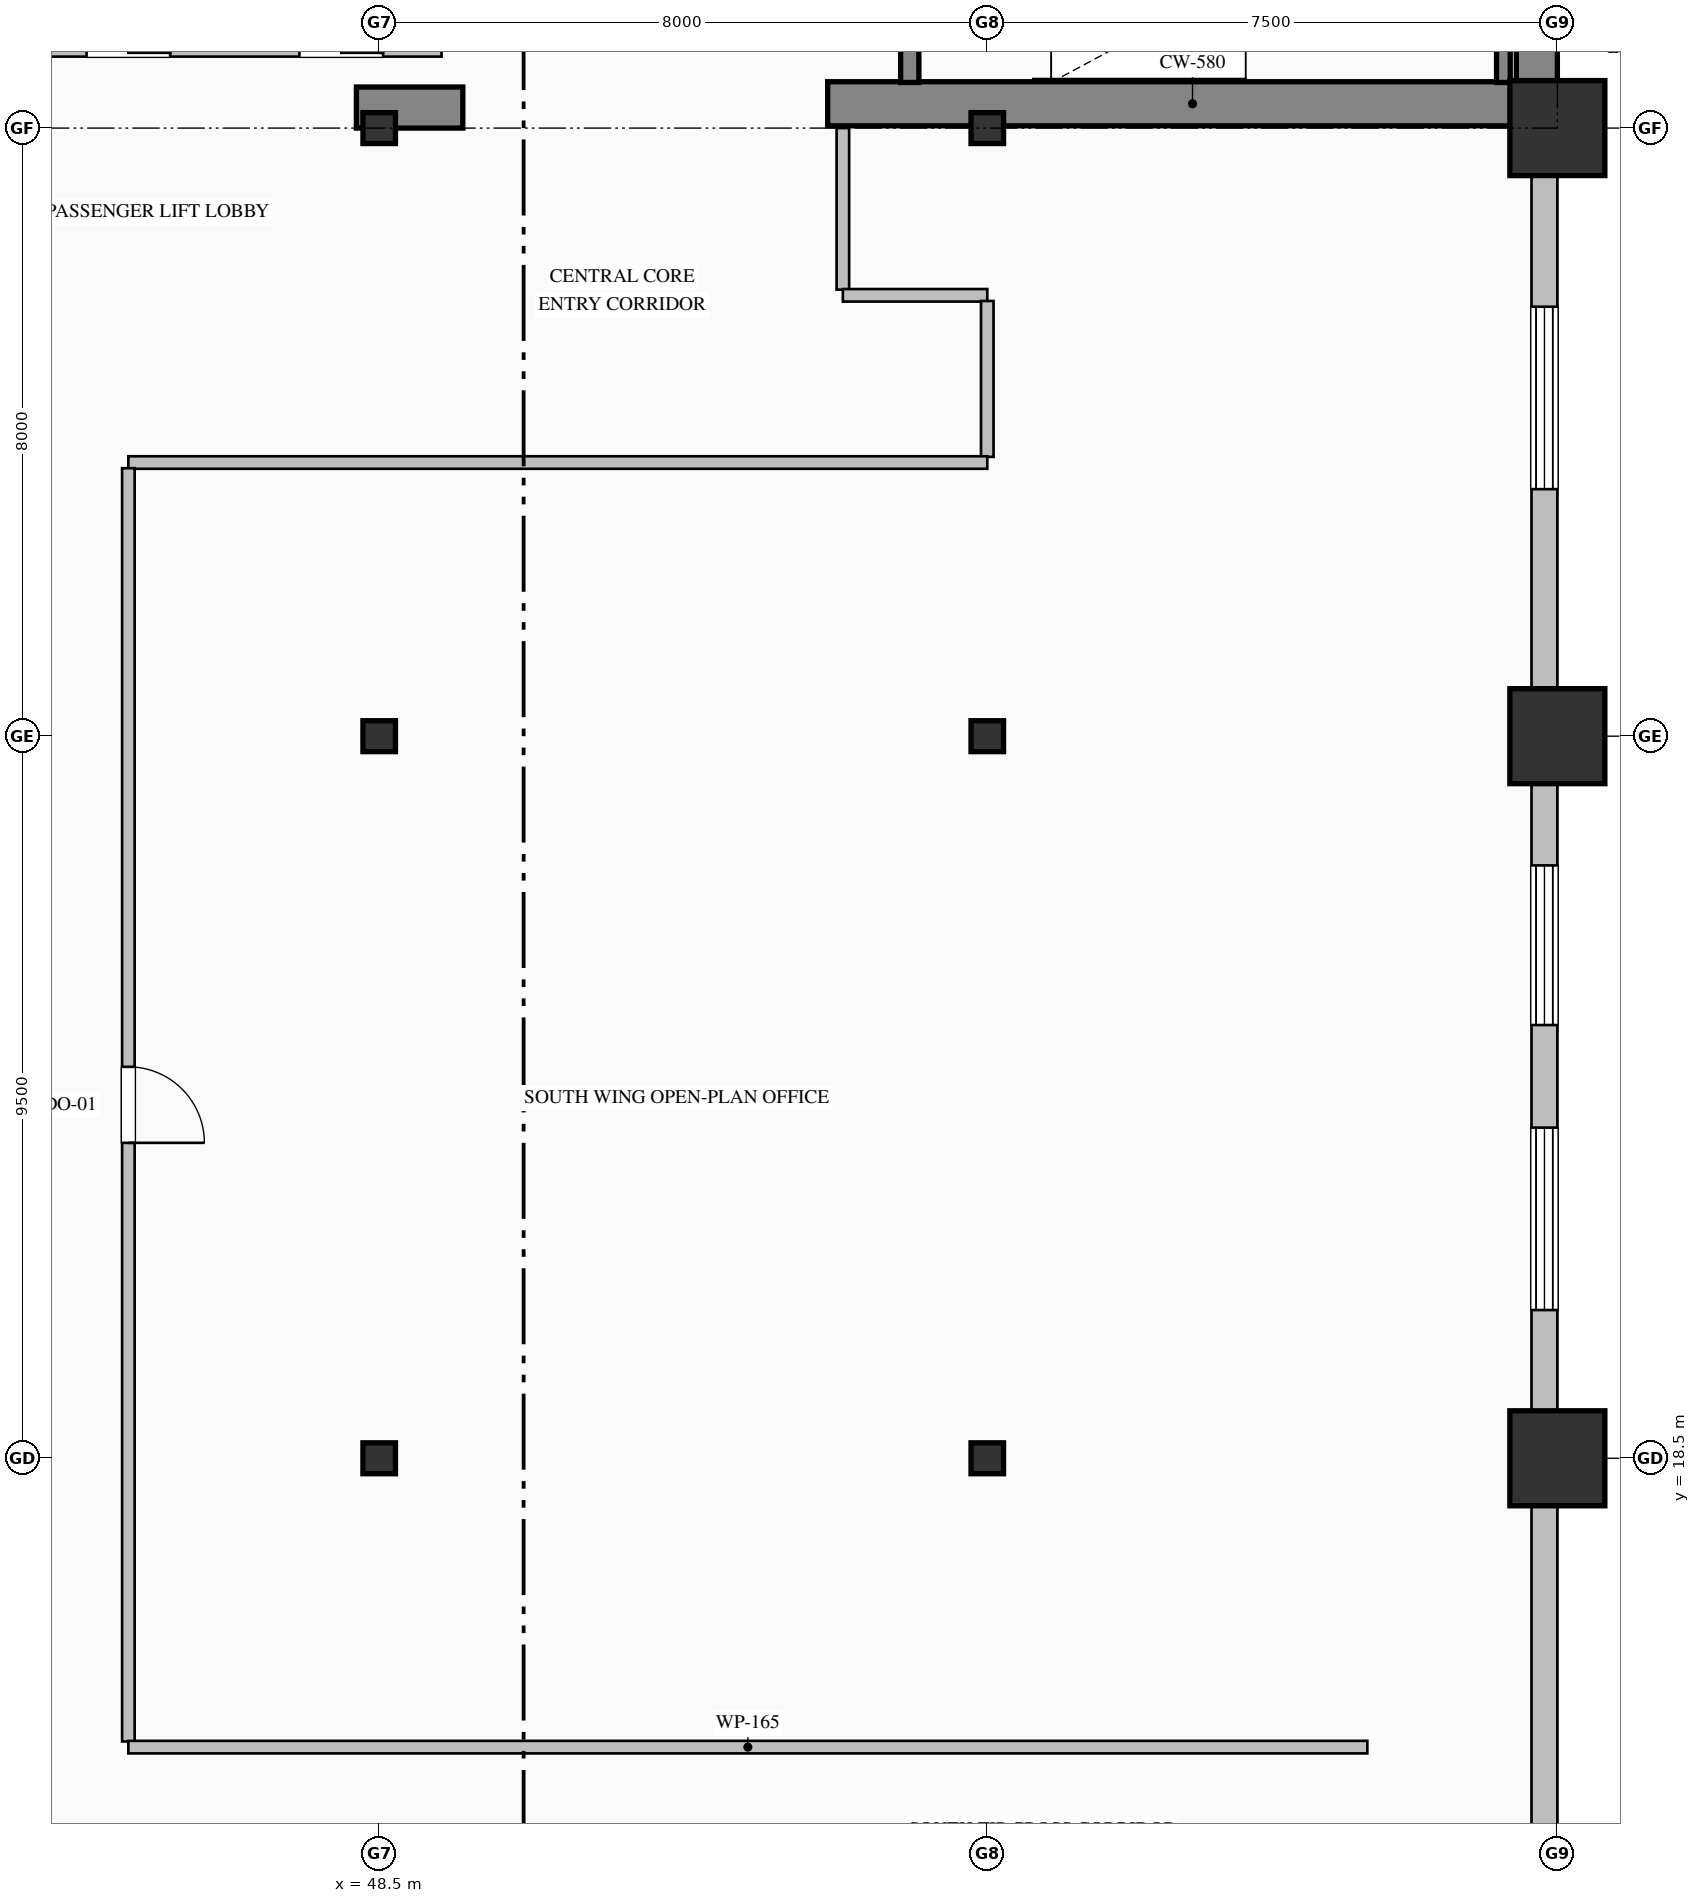
"""IFC4 building model, lengths in metres.
Left out: names, types, materials, properties, quantities, classifications, styles, units other than length and angle.
Written with IfcOpenShell. Run it as: python <this file> out.ifc"""

import sys

from ifc_helpers import new_model, si_unit, direction, frame, frame_2d, origin, origin_2d, place, context, subcontext, project, spatial, rectangle, hollow_rectangle, i_section, extrude, element, fill, save


model = new_model("IFC4")
c1 = context("Model", 3, precision=1e-05, world=origin(), true_north=direction((0.0, 1.0)))
c2 = subcontext(c1, "Body", "Model", "MODEL_VIEW")
j1 = project(units=[si_unit("LENGTHUNIT", "METRE"), si_unit("PLANEANGLEUNIT", "RADIAN")], contexts=[c1])
p1 = place(None, origin())
s1 = spatial("IfcSite", under=j1, at=p1, CompositionType="ELEMENT")
p2 = place(p1, origin())
s2 = spatial("IfcBuilding", under=s1, at=p2, CompositionType="ELEMENT")
p3 = place(p2, frame((0.0, 0.0, 48.2)))
s3 = spatial("IfcBuildingStorey", under=s2, at=p3, CompositionType="ELEMENT", Elevation=48.2)
p4 = place(p3, frame((63.73, 36.32, 0.0), z_axis=(0.0, 0.0, 1.0), x_axis=(0.0, 1.0, 0.0)))
e1 = element("IfcWall", 1, at=p4, inside=s3, PredefinedType="SHEAR", context=c2, shape_type="SweptSolid", body=[
    extrude(rectangle(XDim=15.14, YDim=0.54, at=frame_2d((7.57, 0.0))), origin(), (0.0, 0.0, 1.0), 3.75),
])
p5 = place(p3, frame((48.2, 36.27, 0.0), z_axis=(0.0, 0.0, 1.0), x_axis=(1.0, 0.0, 0.0)))
e2 = element("IfcWall", 2, at=p5, inside=s3, PredefinedType="SHEAR", context=c2, shape_type="SweptSolid", body=[
    extrude(rectangle(XDim=1.4, YDim=0.54, at=frame_2d((0.7, 0.0))), origin(), (0.0, 0.0, 1.0), 3.75),
])
p6 = place(p3, frame((54.4, 36.32, 0.0), z_axis=(0.0, 0.0, 1.0), x_axis=(1.0, 0.0, 0.0)))
e3 = element("IfcWall", 3, at=p6, inside=s3, PredefinedType="SHEAR", context=c2, shape_type="SweptSolid", body=[
    extrude(rectangle(XDim=9.6, YDim=0.58, at=frame_2d((4.8, 0.0))), origin(), (0.0, 0.0, 1.0), 4.0),
])
for number, where, z_axis, x_axis in (
    (4, (48.5, 18.5, 0.0), (0.0, 0.0, 1.0), (1.0, 0.0, 0.0)),
    (5, (48.5, 28.0, 0.0), (0.0, 0.0, 1.0), (1.0, 0.0, 0.0)),
    (6, (48.5, 36.0, 0.0), (0.0, 0.0, 1.0), (1.0, 0.0, 0.0)),
    (7, (56.5, 18.5, 0.0), (0.0, 0.0, 1.0), (1.0, 0.0, 0.0)),
    (8, (56.5, 28.0, 0.0), (0.0, 0.0, 1.0), (1.0, 0.0, 0.0)),
    (9, (56.5, 36.0, 0.0), (0.0, 0.0, 1.0), (1.0, 0.0, 0.0)),
):
    element("IfcColumn", number, at=place(p3, frame(where, z_axis=z_axis, x_axis=x_axis)), inside=s3, PredefinedType="COLUMN", context=c2, shape_type="SweptSolid", body=[
        extrude(i_section(OverallWidth=0.407, OverallDepth=0.428, WebThickness=0.02, FlangeThickness=0.035, FilletRadius=0.022, at=origin_2d()), origin(), (0.0, 0.0, 1.0), 4.0),
    ])
for number, where, z_axis, x_axis in (
    (10, (64.0, 18.5, 0.0), (0.0, 0.0, 1.0), (1.0, 0.0, 0.0)),
    (11, (64.0, 28.0, 0.0), (0.0, 0.0, 1.0), (1.0, 0.0, 0.0)),
    (12, (64.0, 36.0, 0.0), (0.0, 0.0, 1.0), (1.0, 0.0, 0.0)),
):
    element("IfcColumn", number, at=place(p3, frame(where, z_axis=z_axis, x_axis=x_axis)), inside=s3, PredefinedType="COLUMN", context=c2, shape_type="SweptSolid", body=[
        extrude(hollow_rectangle(XDim=1.25, YDim=1.25, WallThickness=0.045, at=origin_2d()), origin(), (0.0, 0.0, 1.0), 4.0),
    ])
p7 = place(p3, frame((63.83, 36.05, 0.0), z_axis=(0.0, 0.0, 1.0), x_axis=(0.0, -1.0, 0.0)))
e13 = element("IfcWall", 13, at=p7, inside=s3, PredefinedType="SOLIDWALL", context=c2, shape_type="SweptSolid", body=[
    extrude(rectangle(XDim=28.05, YDim=0.34, at=frame_2d((14.025, 0.0))), origin(), (0.0, 0.0, 1.0), 3.25),
])
p8 = place(p7, frame((2.4, 0.0, 0.8)))
e14 = element("IfcOpeningElement", 14, at=p8, cuts=e13, PredefinedType="OPENING", context=c2, shape_type="SweptSolid", body=[
    extrude(rectangle(XDim=2.4, YDim=2.15, at=frame_2d((1.2, 1.075))), frame((0.0, 0.18, 0.0), z_axis=(0.0, -1.0, 0.0), x_axis=(1.0, 0.0, 0.0)), (0.0, 0.0, 1.0), 0.36),
])
p9 = place(p7, frame((9.75, 0.0, 0.85)))
e15 = element("IfcOpeningElement", 15, at=p9, cuts=e13, PredefinedType="OPENING", context=c2, shape_type="SweptSolid", body=[
    extrude(rectangle(XDim=2.1, YDim=2.05, at=frame_2d((1.05, 1.025))), frame((0.0, 0.18, 0.0), z_axis=(0.0, -1.0, 0.0), x_axis=(1.0, 0.0, 0.0)), (0.0, 0.0, 1.0), 0.36),
])
p10 = place(p7, frame((13.2, 0.0, 0.8)))
e16 = element("IfcOpeningElement", 16, at=p10, cuts=e13, PredefinedType="OPENING", context=c2, shape_type="SweptSolid", body=[
    extrude(rectangle(XDim=2.4, YDim=2.15, at=frame_2d((1.2, 1.075))), frame((0.0, 0.18, 0.0), z_axis=(0.0, -1.0, 0.0), x_axis=(1.0, 0.0, 0.0)), (0.0, 0.0, 1.0), 0.36),
])
p11 = place(p3, frame((55.48, 39.75, 0.0), z_axis=(0.0, 0.0, 1.0), x_axis=(0.0, -1.0, 0.0)))
e17 = element("IfcWall", 17, at=p11, inside=s3, PredefinedType="SOLIDWALL", context=c2, shape_type="SweptSolid", body=[
    extrude(rectangle(XDim=3.15, YDim=0.24, at=frame_2d((1.575, 0.0))), origin(), (0.0, 0.0, 1.0), 4.0),
])
p12 = place(p11, frame((1.0, 0.0, 0.0)))
e18 = element("IfcOpeningElement", 18, at=p12, cuts=e17, PredefinedType="OPENING", context=c2, shape_type="SweptSolid", body=[
    extrude(rectangle(XDim=1.15, YDim=2.2, at=frame_2d((0.575, 1.1))), frame((0.0, 0.13, 0.0), z_axis=(0.0, -1.0, 0.0), x_axis=(1.0, 0.0, 0.0)), (0.0, 0.0, 1.0), 0.26),
])
p13 = place(p3, frame((63.29, 36.6, 0.0), z_axis=(0.0, 0.0, 1.0), x_axis=(0.0, 1.0, 0.0)))
e19 = element("IfcWall", 19, at=p13, inside=s3, PredefinedType="SOLIDWALL", context=c2, shape_type="SweptSolid", body=[
    extrude(rectangle(XDim=3.15, YDim=0.18, at=frame_2d((1.575, 0.0))), origin(), (0.0, 0.0, 1.0), 4.0),
])
p14 = place(p3, frame((49.32, 37.05, 0.0), z_axis=(0.0, 0.0, 1.0), x_axis=(-1.0, 0.0, 0.0)))
e20 = element("IfcWall", 20, at=p14, inside=s3, PredefinedType="PARTITIONING", context=c2, shape_type="SweptSolid", body=[
    extrude(rectangle(XDim=8.24, YDim=0.22, at=frame_2d((4.12, 0.0))), origin(), (0.0, 0.0, 1.0), 3.75),
])
p15 = place(p14, frame((6.37, 0.0, 0.0)))
e21 = element("IfcOpeningElement", 21, at=p15, cuts=e20, PredefinedType="OPENING", context=c2, shape_type="SweptSolid", body=[
    extrude(rectangle(XDim=1.1, YDim=2.2, at=frame_2d((0.55, 1.1))), frame((0.0, 0.12, 0.0), z_axis=(0.0, -1.0, 0.0), x_axis=(1.0, 0.0, 0.0)), (0.0, 0.0, 1.0), 0.24),
])
p16 = place(p14, frame((3.57, 0.0, 0.0)))
e22 = element("IfcOpeningElement", 22, at=p16, cuts=e20, PredefinedType="OPENING", context=c2, shape_type="SweptSolid", body=[
    extrude(rectangle(XDim=1.1, YDim=2.2, at=frame_2d((0.55, 1.1))), frame((0.0, 0.12, 0.0), z_axis=(0.0, -1.0, 0.0), x_axis=(1.0, 0.0, 0.0)), (0.0, 0.0, 1.0), 0.24),
])
p17 = place(p14, frame((0.77, 0.0, 0.0)))
e23 = element("IfcOpeningElement", 23, at=p17, cuts=e20, PredefinedType="OPENING", context=c2, shape_type="SweptSolid", body=[
    extrude(rectangle(XDim=1.1, YDim=2.2, at=frame_2d((0.55, 1.1))), frame((0.0, 0.12, 0.0), z_axis=(0.0, -1.0, 0.0), x_axis=(1.0, 0.0, 0.0)), (0.0, 0.0, 1.0), 0.24),
])
p18 = place(p3, frame((54.6, 36.0, 0.0), z_axis=(0.0, 0.0, 1.0), x_axis=(0.0, -1.0, 0.0)))
e24 = element("IfcWall", 24, at=p18, inside=s3, PredefinedType="PARTITIONING", context=c2, shape_type="SweptSolid", body=[
    extrude(rectangle(XDim=2.125, YDim=0.165, at=frame_2d((1.063, 0.0))), origin(), (0.0, 0.0, 1.0), 3.75),
])
p19 = place(p3, frame((54.6, 33.8, 0.0), z_axis=(0.0, 0.0, 1.0), x_axis=(1.0, 0.0, 0.0)))
e25 = element("IfcWall", 25, at=p19, inside=s3, PredefinedType="PARTITIONING", context=c2, shape_type="SweptSolid", body=[
    extrude(rectangle(XDim=1.9, YDim=0.165, at=frame_2d((0.95, 0.0))), origin(), (0.0, 0.0, 1.0), 3.75),
])
p20 = place(p3, frame((56.5, 33.726, 0.0), z_axis=(0.0, 0.0, 1.0), x_axis=(0.0, -1.0, 0.0)))
e26 = element("IfcWall", 26, at=p20, inside=s3, PredefinedType="PARTITIONING", context=c2, shape_type="SweptSolid", body=[
    extrude(rectangle(XDim=2.051, YDim=0.165, at=frame_2d((1.025, 0.0))), origin(), (0.0, 0.0, 1.0), 3.042),
])
p21 = place(p3, frame((56.5, 31.6, 0.0), z_axis=(0.0, 0.0, 1.0), x_axis=(-1.0, 0.0, 0.0)))
e27 = element("IfcWall", 27, at=p21, inside=s3, PredefinedType="PARTITIONING", context=c2, shape_type="SweptSolid", body=[
    extrude(rectangle(XDim=11.3, YDim=0.165, at=frame_2d((5.65, 0.0))), origin(), (0.0, 0.0, 1.0), 3.75),
])
p22 = place(p3, frame((45.2, 31.525, 0.0), z_axis=(0.0, 0.0, 1.0), x_axis=(0.0, -1.0, 0.0)))
e28 = element("IfcWall", 28, at=p22, inside=s3, PredefinedType="PARTITIONING", context=c2, shape_type="SweptSolid", body=[
    extrude(rectangle(XDim=16.751, YDim=0.165, at=frame_2d((8.375, 0.0))), origin(), (0.0, 0.0, 1.0), 3.75),
])
p23 = place(p22, frame((7.875, 0.0, 0.0)))
e29 = element("IfcOpeningElement", 29, at=p23, cuts=e28, PredefinedType="OPENING", context=c2, shape_type="SweptSolid", body=[
    extrude(rectangle(XDim=1.0, YDim=2.15, at=frame_2d((0.5, 1.075))), frame((0.0, 0.093, 0.0), z_axis=(0.0, -1.0, 0.0), x_axis=(1.0, 0.0, 0.0)), (0.0, 0.0, 1.0), 0.185),
])
p24 = place(p3, frame((45.2, 14.7, 0.0), z_axis=(0.0, 0.0, 1.0), x_axis=(1.0, 0.0, 0.0)))
e30 = element("IfcWall", 30, at=p24, inside=s3, PredefinedType="PARTITIONING", context=c2, shape_type="SweptSolid", body=[
    extrude(rectangle(XDim=16.3, YDim=0.165, at=frame_2d((8.15, 0.0))), origin(), (0.0, 0.0, 1.0), 3.75),
])
p25 = place(p8, origin())
e31 = element("IfcWindow", 31, at=p25, inside=s3, PartitioningType="TRIPLE_PANEL_VERTICAL", PredefinedType="WINDOW", context=c2, shape_type="SweptSolid", body=[
    extrude(rectangle(XDim=2.4, YDim=2.15, at=frame_2d((1.2, 1.075))), frame((0.0, 0.15, 0.0), z_axis=(0.0, -1.0, 0.0), x_axis=(1.0, 0.0, 0.0)), (0.0, 0.0, 1.0), 0.06),
])
fill(e14, e31)
p26 = place(p9, origin())
e32 = element("IfcWindow", 32, at=p26, inside=s3, PartitioningType="TRIPLE_PANEL_VERTICAL", PredefinedType="WINDOW", context=c2, shape_type="SweptSolid", body=[
    extrude(rectangle(XDim=2.1, YDim=2.05, at=frame_2d((1.05, 1.025))), frame((0.0, 0.15, 0.0), z_axis=(0.0, -1.0, 0.0), x_axis=(1.0, 0.0, 0.0)), (0.0, 0.0, 1.0), 0.06),
])
fill(e15, e32)
p27 = place(p10, origin())
e33 = element("IfcWindow", 33, at=p27, inside=s3, PartitioningType="TRIPLE_PANEL_VERTICAL", PredefinedType="WINDOW", context=c2, shape_type="SweptSolid", body=[
    extrude(rectangle(XDim=2.4, YDim=2.15, at=frame_2d((1.2, 1.075))), frame((0.0, 0.15, 0.0), z_axis=(0.0, -1.0, 0.0), x_axis=(1.0, 0.0, 0.0)), (0.0, 0.0, 1.0), 0.06),
])
fill(e16, e33)
p28 = place(p23, origin())
e34 = element("IfcDoor", 34, at=p28, inside=s3, OperationType="SINGLE_SWING_RIGHT", PredefinedType="DOOR", context=c2, shape_type="SweptSolid", body=[
    extrude(rectangle(XDim=1.0, YDim=2.15, at=frame_2d((0.5, 1.075))), frame((0.0, 0.025, 0.0), z_axis=(0.0, -1.0, 0.0), x_axis=(1.0, 0.0, 0.0)), (0.0, 0.0, 1.0), 0.05),
])
fill(e29, e34)
save(model, sys.argv[1])
